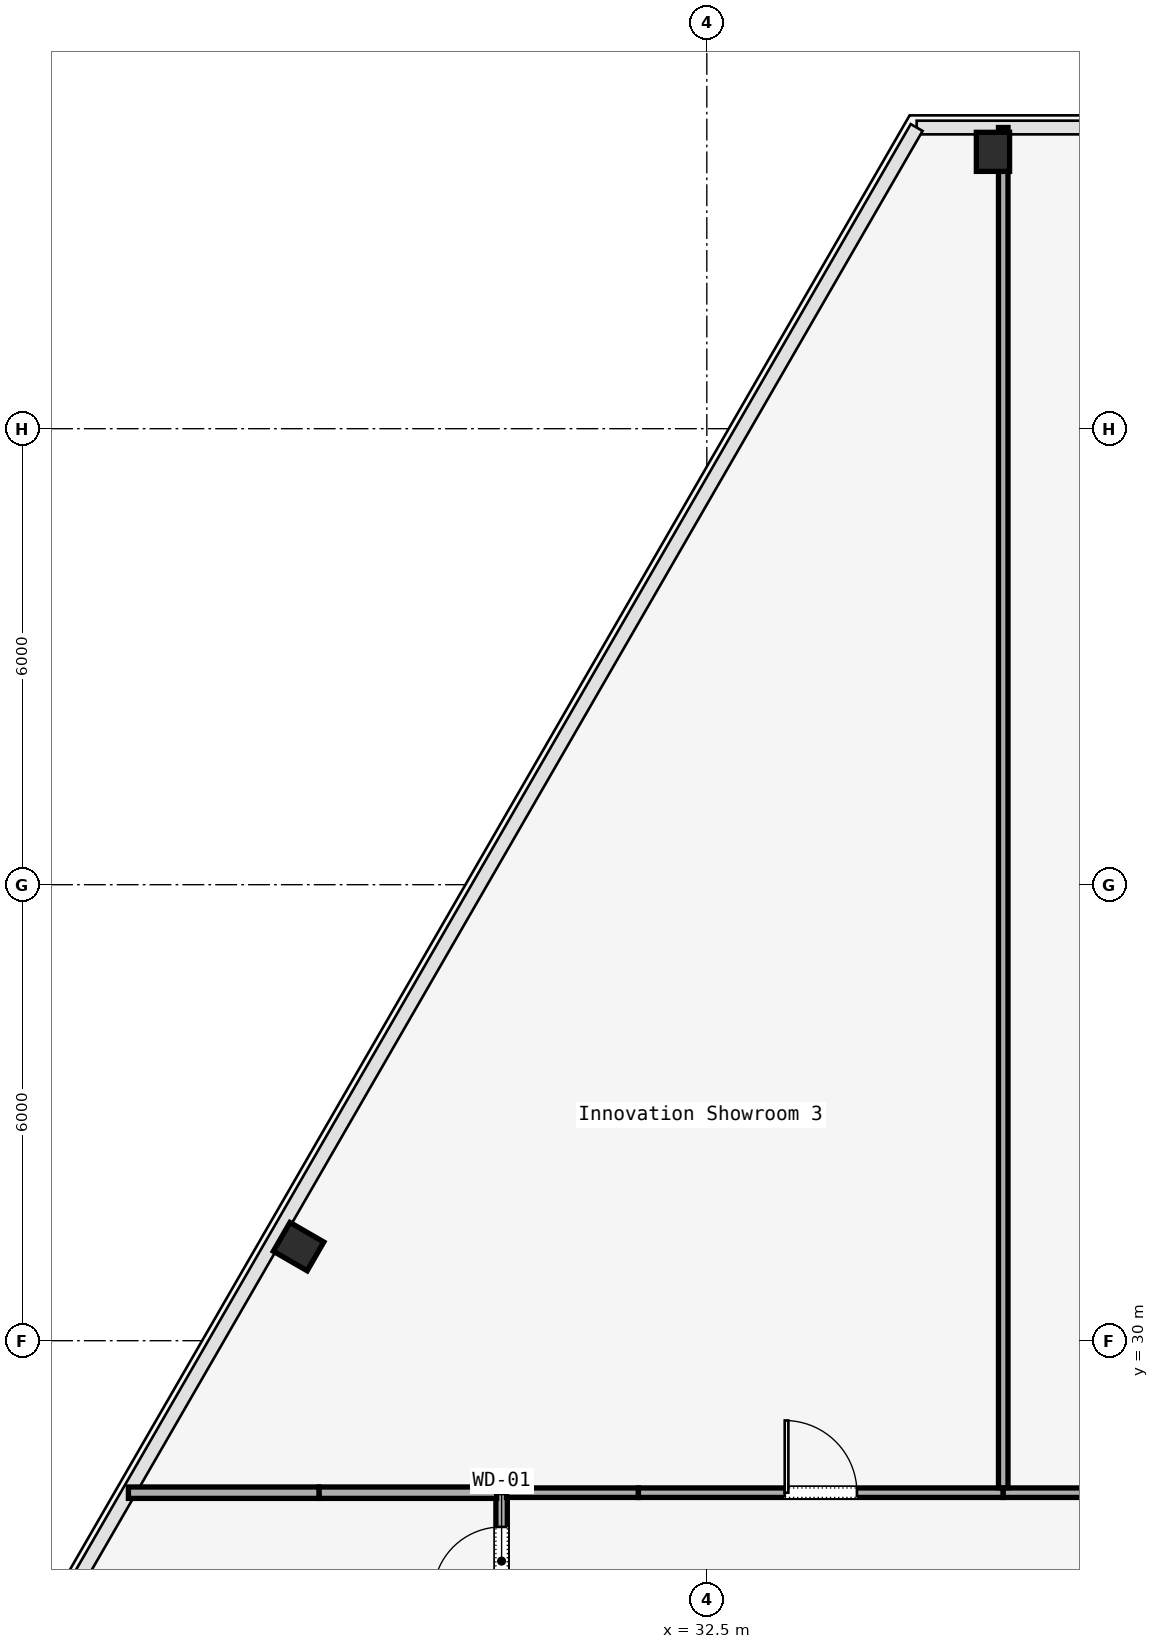
"""IFC4 building model, lengths in metres.
Left out: names, types, materials, properties, quantities, classifications, styles, units other than length and angle.
Written with IfcOpenShell. Run it as: python <this file> out.ifc"""

import sys

from ifc_helpers import new_model, si_unit, direction, frame, frame_2d, origin, origin_2d, place, context, subcontext, project, spatial, rectangle, i_section, extrude, element, fill, save


model = new_model("IFC4")
c1 = context("Model", 3, precision=1e-05, world=origin(), true_north=direction((0.0, 1.0)))
c2 = subcontext(c1, "Body", "Model", "MODEL_VIEW")
j1 = project(units=[si_unit("LENGTHUNIT", "METRE"), si_unit("PLANEANGLEUNIT", "RADIAN")], contexts=[c1])
p1 = place(None, origin())
s1 = spatial("IfcSite", under=j1, at=p1, CompositionType="ELEMENT")
p2 = place(p1, origin())
s2 = spatial("IfcBuilding", under=s1, at=p2, CompositionType="ELEMENT")
p3 = place(p2, frame((0.0, 0.0, 104.4)))
s3 = spatial("IfcBuildingStorey", under=s2, at=p3, CompositionType="ELEMENT", Elevation=104.4)
for number, where, z_axis, x_axis in (
    (1, (36.265, 45.643, 0.0), (0.0, 0.0, 1.0), (1.0, 0.0, 0.0)),
    (2, (27.129, 31.238, 0.0), (0.0, 0.0, 1.0), (0.5, 0.866, 0.0)),
):
    element("IfcColumn", number, at=place(p3, frame(where, z_axis=z_axis, x_axis=x_axis)), inside=s3, PredefinedType="COLUMN", context=c2, shape_type="SweptSolid", body=[
        extrude(i_section(OverallWidth=0.437, OverallDepth=0.514, WebThickness=0.061, FlangeThickness=0.077, FilletRadius=0.015, at=origin_2d()), origin(), (0.0, 0.0, 1.0), 3.58),
    ])
p4 = place(p3, frame((29.8, 26.2, 0.0), z_axis=(0.0, 0.0, 1.0), x_axis=(0.0, 1.0, 0.0)))
e3 = element("IfcWall", 3, at=p4, inside=s3, PredefinedType="PARTITIONING", context=c2, shape_type="SweptSolid", body=[
    extrude(rectangle(XDim=1.8, YDim=0.15, at=frame_2d((0.9, 0.0))), origin(), (0.0, 0.0, 1.0), 2.95),
])
p5 = place(p4, frame((0.45, 0.0, 0.0)))
e4 = element("IfcOpeningElement", 4, at=p5, cuts=e3, PredefinedType="OPENING", context=c2, shape_type="SweptSolid", body=[
    extrude(rectangle(XDim=0.9, YDim=2.15, at=frame_2d((0.45, 1.075))), frame((0.0, 0.075, 0.0), z_axis=(0.0, -1.0, 0.0), x_axis=(1.0, 0.0, 0.0)), (0.0, 0.0, 1.0), 0.15),
])
p6 = place(p3, frame((29.865, 28.0, 0.0), z_axis=(0.0, 0.0, 1.0), x_axis=(1.0, 0.0, 0.0)))
e5 = element("IfcWall", 5, at=p6, inside=s3, PredefinedType="PARTITIONING", context=c2, shape_type="SweptSolid", body=[
    extrude(rectangle(XDim=1.735, YDim=0.125, at=frame_2d((0.868, 0.0))), origin(), (0.0, 0.0, 1.0), 2.95),
])
p7 = place(p3, frame((31.6, 28.0, 0.0), z_axis=(0.0, 0.0, 1.0), x_axis=(1.0, 0.0, 0.0)))
e6 = element("IfcWall", 6, at=p7, inside=s3, PredefinedType="PARTITIONING", context=c2, shape_type="SweptSolid", body=[
    extrude(rectangle(XDim=4.8, YDim=0.125, at=frame_2d((2.4, 0.0))), origin(), (0.0, 0.0, 1.0), 2.95),
])
p8 = place(p7, frame((1.925, 0.0, 0.0)))
e7 = element("IfcOpeningElement", 7, at=p8, cuts=e6, PredefinedType="OPENING", context=c2, shape_type="SweptSolid", body=[
    extrude(rectangle(XDim=0.95, YDim=2.2, at=frame_2d((0.475, 1.1))), frame((0.0, 0.062, 0.0), z_axis=(0.0, -1.0, 0.0), x_axis=(1.0, 0.0, 0.0)), (0.0, 0.0, 1.0), 0.125),
])
p9 = place(p3, frame((36.4, 28.0, 0.0), z_axis=(0.0, 0.0, 1.0), x_axis=(1.0, 0.0, 0.0)))
e8 = element("IfcWall", 8, at=p9, inside=s3, PredefinedType="PARTITIONING", context=c2, shape_type="SweptSolid", body=[
    extrude(rectangle(XDim=5.07, YDim=0.125, at=frame_2d((2.535, 0.0))), origin(), (0.0, 0.0, 1.0), 2.95),
])
p10 = place(p9, frame((2.06, 0.0, 0.0)))
e9 = element("IfcOpeningElement", 9, at=p10, cuts=e8, PredefinedType="OPENING", context=c2, shape_type="SweptSolid", body=[
    extrude(rectangle(XDim=0.95, YDim=2.2, at=frame_2d((0.475, 1.1))), frame((0.0, 0.062, 0.0), z_axis=(0.0, -1.0, 0.0), x_axis=(1.0, 0.0, 0.0)), (0.0, 0.0, 1.0), 0.125),
])
p11 = place(p3, frame((24.89, 28.0, 0.0), z_axis=(0.0, 0.0, 1.0), x_axis=(1.0, 0.0, 0.0)))
e10 = element("IfcWall", 10, at=p11, inside=s3, PredefinedType="PARTITIONING", context=c2, shape_type="SweptSolid", body=[
    extrude(rectangle(XDim=2.51, YDim=0.15, at=frame_2d((1.255, 0.0))), origin(), (0.0, 0.0, 1.0), 2.95),
])
p12 = place(p3, frame((27.4, 28.0, 0.0), z_axis=(0.0, 0.0, 1.0), x_axis=(1.0, 0.0, 0.0)))
e11 = element("IfcWall", 11, at=p12, inside=s3, PredefinedType="PARTITIONING", context=c2, shape_type="SweptSolid", body=[
    extrude(rectangle(XDim=2.335, YDim=0.15, at=frame_2d((1.167, 0.0))), origin(), (0.0, 0.0, 1.0), 2.95),
])
p13 = place(p3, frame((36.4, 45.963, 0.0), z_axis=(0.0, 0.0, 1.0), x_axis=(0.0, -1.0, 0.0)))
e12 = element("IfcWall", 12, at=p13, inside=s3, PredefinedType="PARTITIONING", context=c2, shape_type="SweptSolid", body=[
    extrude(rectangle(XDim=17.898, YDim=0.125, at=frame_2d((8.949, 0.0))), origin(), (0.0, 0.0, 1.0), 2.95),
])
p14 = place(p5, origin())
e13 = element("IfcDoor", 13, at=p14, inside=s3, OperationType="SINGLE_SWING_RIGHT", PredefinedType="DOOR", context=c2, shape_type="SweptSolid", body=[
    extrude(rectangle(XDim=0.9, YDim=2.15, at=frame_2d((0.45, 1.075))), frame((0.0, 0.025, 0.0), z_axis=(0.0, -1.0, 0.0), x_axis=(1.0, 0.0, 0.0)), (0.0, 0.0, 1.0), 0.05),
])
fill(e4, e13)
p15 = place(p8, origin())
e14 = element("IfcDoor", 14, at=p15, inside=s3, OperationType="SINGLE_SWING_RIGHT", PredefinedType="DOOR", context=c2, shape_type="SweptSolid", body=[
    extrude(rectangle(XDim=0.95, YDim=2.2, at=frame_2d((0.475, 1.1))), frame((0.0, 0.025, 0.0), z_axis=(0.0, -1.0, 0.0), x_axis=(1.0, 0.0, 0.0)), (0.0, 0.0, 1.0), 0.05),
])
fill(e7, e14)
save(model, sys.argv[1])
